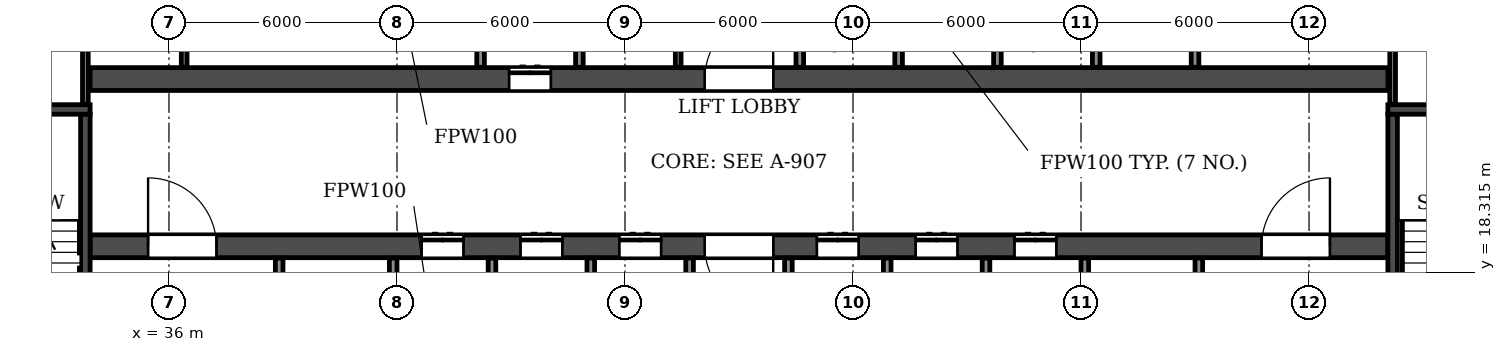
"""IFC4 building model, lengths in metres.
Left out: names, types, materials, properties, quantities, classifications, styles, units other than length and angle.
Written with IfcOpenShell. Run it as: python <this file> out.ifc"""

import sys

from ifc_helpers import new_model, si_unit, direction, frame, frame_2d, origin, place, context, subcontext, project, spatial, rectangle, extrude, element, fill, save


model = new_model("IFC4")
c1 = context("Model", 3, precision=1e-05, world=origin(), true_north=direction((0.0, 1.0)))
c2 = subcontext(c1, "Body", "Model", "MODEL_VIEW")
j1 = project(units=[si_unit("LENGTHUNIT", "METRE"), si_unit("PLANEANGLEUNIT", "RADIAN")], contexts=[c1])
p1 = place(None, origin())
s1 = spatial("IfcSite", under=j1, at=p1, CompositionType="ELEMENT")
p2 = place(p1, origin())
s2 = spatial("IfcBuilding", under=s1, at=p2, CompositionType="ELEMENT")
p3 = place(p2, frame((0.0, 0.0, 26.7)))
s3 = spatial("IfcBuildingStorey", under=s2, at=p3, CompositionType="ELEMENT", Elevation=26.7)
p4 = place(p3, frame((33.925, 19.0, 0.0), z_axis=(0.0, 0.0, 1.0), x_axis=(1.0, 0.0, 0.0)))
e1 = element("IfcWall", 1, at=p4, inside=s3, PredefinedType="SOLIDWALL", context=c2, shape_type="SweptSolid", body=[
    extrude(rectangle(XDim=34.15, YDim=0.6, at=frame_2d((17.075, 0.0))), origin(), (0.0, 0.0, 1.0), 3.05),
])
p5 = place(p4, frame((16.175, 0.0, 0.0)))
e2 = element("IfcOpeningElement", 2, at=p5, cuts=e1, PredefinedType="OPENING", context=c2, shape_type="SweptSolid", body=[
    extrude(rectangle(XDim=1.8, YDim=2.1, at=frame_2d((0.9, 1.05))), frame((0.0, 0.31, 0.0), z_axis=(0.0, -1.0, 0.0), x_axis=(1.0, 0.0, 0.0)), (0.0, 0.0, 1.0), 0.62),
])
p6 = place(p4, frame((1.525, 0.0, 0.0)))
e3 = element("IfcOpeningElement", 3, at=p6, cuts=e1, PredefinedType="OPENING", context=c2, shape_type="SweptSolid", body=[
    extrude(rectangle(XDim=1.8, YDim=2.1, at=frame_2d((0.9, 1.05))), frame((0.0, 0.31, 0.0), z_axis=(0.0, -1.0, 0.0), x_axis=(1.0, 0.0, 0.0)), (0.0, 0.0, 1.0), 0.62),
])
p7 = place(p4, frame((8.725, 0.0, 0.0)))
e4 = element("IfcOpeningElement", 4, at=p7, cuts=e1, PredefinedType="OPENING", context=c2, shape_type="SweptSolid", body=[
    extrude(rectangle(XDim=1.1, YDim=2.1, at=frame_2d((0.55, 1.05))), frame((0.0, 0.31, 0.0), z_axis=(0.0, -1.0, 0.0), x_axis=(1.0, 0.0, 0.0)), (0.0, 0.0, 1.0), 0.62),
])
p8 = place(p4, frame((11.325, 0.0, 0.0)))
e5 = element("IfcOpeningElement", 5, at=p8, cuts=e1, PredefinedType="OPENING", context=c2, shape_type="SweptSolid", body=[
    extrude(rectangle(XDim=1.1, YDim=2.1, at=frame_2d((0.55, 1.05))), frame((0.0, 0.31, 0.0), z_axis=(0.0, -1.0, 0.0), x_axis=(1.0, 0.0, 0.0)), (0.0, 0.0, 1.0), 0.62),
])
p9 = place(p4, frame((13.925, 0.0, 0.0)))
e6 = element("IfcOpeningElement", 6, at=p9, cuts=e1, PredefinedType="OPENING", context=c2, shape_type="SweptSolid", body=[
    extrude(rectangle(XDim=1.1, YDim=2.1, at=frame_2d((0.55, 1.05))), frame((0.0, 0.31, 0.0), z_axis=(0.0, -1.0, 0.0), x_axis=(1.0, 0.0, 0.0)), (0.0, 0.0, 1.0), 0.62),
])
p10 = place(p4, frame((19.125, 0.0, 0.0)))
e7 = element("IfcOpeningElement", 7, at=p10, cuts=e1, PredefinedType="OPENING", context=c2, shape_type="SweptSolid", body=[
    extrude(rectangle(XDim=1.1, YDim=2.1, at=frame_2d((0.55, 1.05))), frame((0.0, 0.31, 0.0), z_axis=(0.0, -1.0, 0.0), x_axis=(1.0, 0.0, 0.0)), (0.0, 0.0, 1.0), 0.62),
])
p11 = place(p4, frame((21.725, 0.0, 0.0)))
e8 = element("IfcOpeningElement", 8, at=p11, cuts=e1, PredefinedType="OPENING", context=c2, shape_type="SweptSolid", body=[
    extrude(rectangle(XDim=1.1, YDim=2.1, at=frame_2d((0.55, 1.05))), frame((0.0, 0.31, 0.0), z_axis=(0.0, -1.0, 0.0), x_axis=(1.0, 0.0, 0.0)), (0.0, 0.0, 1.0), 0.62),
])
p12 = place(p4, frame((24.325, 0.0, 0.0)))
e9 = element("IfcOpeningElement", 9, at=p12, cuts=e1, PredefinedType="OPENING", context=c2, shape_type="SweptSolid", body=[
    extrude(rectangle(XDim=1.1, YDim=2.1, at=frame_2d((0.55, 1.05))), frame((0.0, 0.31, 0.0), z_axis=(0.0, -1.0, 0.0), x_axis=(1.0, 0.0, 0.0)), (0.0, 0.0, 1.0), 0.62),
])
p13 = place(p4, frame((30.825, 0.0, 0.0)))
e10 = element("IfcOpeningElement", 10, at=p13, cuts=e1, PredefinedType="OPENING", context=c2, shape_type="SweptSolid", body=[
    extrude(rectangle(XDim=1.8, YDim=2.1, at=frame_2d((0.9, 1.05))), frame((0.0, 0.31, 0.0), z_axis=(0.0, -1.0, 0.0), x_axis=(1.0, 0.0, 0.0)), (0.0, 0.0, 1.0), 0.62),
])
p14 = place(p3, frame((33.925, 23.4, 0.0), z_axis=(0.0, 0.0, 1.0), x_axis=(1.0, 0.0, 0.0)))
e11 = element("IfcWall", 11, at=p14, inside=s3, PredefinedType="SOLIDWALL", context=c2, shape_type="SweptSolid", body=[
    extrude(rectangle(XDim=34.15, YDim=0.6, at=frame_2d((17.075, 0.0))), origin(), (0.0, 0.0, 1.0), 3.05),
])
p15 = place(p14, frame((16.175, 0.0, 0.0)))
e12 = element("IfcOpeningElement", 12, at=p15, cuts=e11, PredefinedType="OPENING", context=c2, shape_type="SweptSolid", body=[
    extrude(rectangle(XDim=1.8, YDim=2.1, at=frame_2d((0.9, 1.05))), frame((0.0, 0.31, 0.0), z_axis=(0.0, -1.0, 0.0), x_axis=(1.0, 0.0, 0.0)), (0.0, 0.0, 1.0), 0.62),
])
p16 = place(p14, frame((11.025, 0.0, 0.0)))
e13 = element("IfcOpeningElement", 13, at=p16, cuts=e11, PredefinedType="OPENING", context=c2, shape_type="SweptSolid", body=[
    extrude(rectangle(XDim=1.1, YDim=2.1, at=frame_2d((0.55, 1.05))), frame((0.0, 0.31, 0.0), z_axis=(0.0, -1.0, 0.0), x_axis=(1.0, 0.0, 0.0)), (0.0, 0.0, 1.0), 0.62),
])
p17 = place(p3, frame((33.8, 14.9, 0.0), z_axis=(0.0, 0.0, 1.0), x_axis=(0.0, 1.0, 0.0)))
e14 = element("IfcWall", 14, at=p17, inside=s3, PredefinedType="SOLIDWALL", context=c2, shape_type="SweptSolid", body=[
    extrude(rectangle(XDim=7.575, YDim=0.25, at=frame_2d((3.788, 0.0))), origin(), (0.0, 0.0, 1.0), 3.05),
])
p18 = place(p17, frame((0.4, 0.0, 0.0)))
e15 = element("IfcOpeningElement", 15, at=p18, cuts=e14, PredefinedType="OPENING", context=c2, shape_type="SweptSolid", body=[
    extrude(rectangle(XDim=1.0, YDim=2.1, at=frame_2d((0.5, 1.05))), frame((0.0, 0.135, 0.0), z_axis=(0.0, -1.0, 0.0), x_axis=(1.0, 0.0, 0.0)), (0.0, 0.0, 1.0), 0.27),
])
p19 = place(p3, frame((29.875, 22.6, 0.0), z_axis=(0.0, 0.0, 1.0), x_axis=(1.0, 0.0, 0.0)))
e16 = element("IfcWall", 16, at=p19, inside=s3, PredefinedType="SOLIDWALL", context=c2, shape_type="SweptSolid", body=[
    extrude(rectangle(XDim=4.05, YDim=0.25, at=frame_2d((2.025, 0.0))), origin(), (0.0, 0.0, 1.0), 3.05),
])
p20 = place(p3, frame((68.2, 14.9, 0.0), z_axis=(0.0, 0.0, 1.0), x_axis=(0.0, 1.0, 0.0)))
e17 = element("IfcWall", 17, at=p20, inside=s3, PredefinedType="SOLIDWALL", context=c2, shape_type="SweptSolid", body=[
    extrude(rectangle(XDim=7.575, YDim=0.25, at=frame_2d((3.788, 0.0))), origin(), (0.0, 0.0, 1.0), 3.05),
])
p21 = place(p20, frame((0.4, 0.0, 0.0)))
e18 = element("IfcOpeningElement", 18, at=p21, cuts=e17, PredefinedType="OPENING", context=c2, shape_type="SweptSolid", body=[
    extrude(rectangle(XDim=1.0, YDim=2.1, at=frame_2d((0.5, 1.05))), frame((0.0, 0.135, 0.0), z_axis=(0.0, -1.0, 0.0), x_axis=(1.0, 0.0, 0.0)), (0.0, 0.0, 1.0), 0.27),
])
p22 = place(p3, frame((68.075, 22.6, 0.0), z_axis=(0.0, 0.0, 1.0), x_axis=(1.0, 0.0, 0.0)))
e19 = element("IfcWall", 19, at=p22, inside=s3, PredefinedType="SOLIDWALL", context=c2, shape_type="SweptSolid", body=[
    extrude(rectangle(XDim=4.05, YDim=0.25, at=frame_2d((2.025, 0.0))), origin(), (0.0, 0.0, 1.0), 3.05),
])
for number, where, z_axis, x_axis in (
    (20, (49.4, 23.71, 0.0), (0.0, 0.0, 1.0), (0.0, 1.0, 0.0)),
    (21, (36.4, 23.71, 0.0), (0.0, 0.0, 1.0), (0.0, 1.0, 0.0)),
):
    element("IfcWall", number, at=place(p3, frame(where, z_axis=z_axis, x_axis=x_axis)), inside=s3, PredefinedType="PARTITIONING", context=c2, shape_type="SweptSolid", body=[
        extrude(rectangle(XDim=3.78, YDim=0.15, at=frame_2d((1.89, 0.0))), origin(), (0.0, 0.0, 1.0), 3.05),
    ])
p23 = place(p3, frame((63.0, 23.71, 0.0), z_axis=(0.0, 0.0, 1.0), x_axis=(0.0, 1.0, 0.0)))
e22 = element("IfcWall", 22, at=p23, inside=s3, PredefinedType="PARTITIONING", context=c2, shape_type="SweptSolid", body=[
    extrude(rectangle(XDim=3.78, YDim=0.2, at=frame_2d((1.89, 0.0))), origin(), (0.0, 0.0, 1.0), 3.05),
])
for number, where, z_axis, x_axis in (
    (23, (33.8, 22.735, 0.0), (0.0, 0.0, 1.0), (0.0, 1.0, 0.0)),
    (24, (68.2, 22.735, 0.0), (0.0, 0.0, 1.0), (0.0, 1.0, 0.0)),
):
    element("IfcWall", number, at=place(p3, frame(where, z_axis=z_axis, x_axis=x_axis)), inside=s3, PredefinedType="PARTITIONING", context=c2, shape_type="SweptSolid", body=[
        extrude(rectangle(XDim=4.755, YDim=0.15, at=frame_2d((2.377, 0.0))), origin(), (0.0, 0.0, 1.0), 3.05),
    ])
p24 = place(p3, frame((38.9, 14.91, 0.0), z_axis=(0.0, 0.0, 1.0), x_axis=(0.0, 1.0, 0.0)))
e25 = element("IfcWall", 25, at=p24, inside=s3, PredefinedType="PARTITIONING", context=c2, shape_type="SweptSolid", body=[
    extrude(rectangle(XDim=3.78, YDim=0.2, at=frame_2d((1.89, 0.0))), origin(), (0.0, 0.0, 1.0), 3.05),
])
p25 = place(p24, frame((1.34, 0.0, 0.0)))
e26 = element("IfcOpeningElement", 26, at=p25, cuts=e25, PredefinedType="OPENING", context=c2, shape_type="SweptSolid", body=[
    extrude(rectangle(XDim=1.1, YDim=2.1, at=frame_2d((0.55, 1.05))), frame((0.0, 0.11, 0.0), z_axis=(0.0, -1.0, 0.0), x_axis=(1.0, 0.0, 0.0)), (0.0, 0.0, 1.0), 0.22),
])
for number, where, z_axis, x_axis in (
    (27, (41.9, 14.91, 0.0), (0.0, 0.0, 1.0), (0.0, 1.0, 0.0)),
    (28, (44.2, 23.71, 0.0), (0.0, 0.0, 1.0), (0.0, 1.0, 0.0)),
):
    element("IfcWall", number, at=place(p3, frame(where, z_axis=z_axis, x_axis=x_axis)), inside=s3, PredefinedType="PARTITIONING", context=c2, shape_type="SweptSolid", body=[
        extrude(rectangle(XDim=3.78, YDim=0.2, at=frame_2d((1.89, 0.0))), origin(), (0.0, 0.0, 1.0), 3.05),
    ])
p26 = place(p3, frame((44.5, 16.3, 0.0), z_axis=(0.0, 0.0, 1.0), x_axis=(0.0, 1.0, 0.0)))
e29 = element("IfcWall", 29, at=p26, inside=s3, PredefinedType="PARTITIONING", context=c2, shape_type="SweptSolid", body=[
    extrude(rectangle(XDim=2.39, YDim=0.2, at=frame_2d((1.195, 0.0))), origin(), (0.0, 0.0, 1.0), 3.05),
])
p27 = place(p3, frame((46.8, 23.71, 0.0), z_axis=(0.0, 0.0, 1.0), x_axis=(0.0, 1.0, 0.0)))
e30 = element("IfcWall", 30, at=p27, inside=s3, PredefinedType="PARTITIONING", context=c2, shape_type="SweptSolid", body=[
    extrude(rectangle(XDim=3.78, YDim=0.2, at=frame_2d((1.89, 0.0))), origin(), (0.0, 0.0, 1.0), 3.05),
])
for number, where, z_axis, x_axis in (
    (31, (47.1, 16.3, 0.0), (0.0, 0.0, 1.0), (0.0, 1.0, 0.0)),
    (32, (49.7, 16.3, 0.0), (0.0, 0.0, 1.0), (0.0, 1.0, 0.0)),
    (33, (52.3, 16.3, 0.0), (0.0, 0.0, 1.0), (0.0, 1.0, 0.0)),
):
    element("IfcWall", number, at=place(p3, frame(where, z_axis=z_axis, x_axis=x_axis)), inside=s3, PredefinedType="PARTITIONING", context=c2, shape_type="SweptSolid", body=[
        extrude(rectangle(XDim=2.39, YDim=0.2, at=frame_2d((1.195, 0.0))), origin(), (0.0, 0.0, 1.0), 3.05),
    ])
p28 = place(p3, frame((52.6, 23.71, 0.0), z_axis=(0.0, 0.0, 1.0), x_axis=(0.0, 1.0, 0.0)))
e34 = element("IfcWall", 34, at=p28, inside=s3, PredefinedType="PARTITIONING", context=c2, shape_type="SweptSolid", body=[
    extrude(rectangle(XDim=2.39, YDim=0.2, at=frame_2d((1.195, 0.0))), origin(), (0.0, 0.0, 1.0), 3.05),
])
p29 = place(p3, frame((54.9, 16.3, 0.0), z_axis=(0.0, 0.0, 1.0), x_axis=(0.0, 1.0, 0.0)))
e35 = element("IfcWall", 35, at=p29, inside=s3, PredefinedType="PARTITIONING", context=c2, shape_type="SweptSolid", body=[
    extrude(rectangle(XDim=2.39, YDim=0.2, at=frame_2d((1.195, 0.0))), origin(), (0.0, 0.0, 1.0), 3.05),
])
p30 = place(p3, frame((55.2, 23.71, 0.0), z_axis=(0.0, 0.0, 1.0), x_axis=(0.0, 1.0, 0.0)))
e36 = element("IfcWall", 36, at=p30, inside=s3, PredefinedType="PARTITIONING", context=c2, shape_type="SweptSolid", body=[
    extrude(rectangle(XDim=2.39, YDim=0.2, at=frame_2d((1.195, 0.0))), origin(), (0.0, 0.0, 1.0), 3.05),
])
p31 = place(p3, frame((57.5, 16.3, 0.0), z_axis=(0.0, 0.0, 1.0), x_axis=(0.0, 1.0, 0.0)))
e37 = element("IfcWall", 37, at=p31, inside=s3, PredefinedType="PARTITIONING", context=c2, shape_type="SweptSolid", body=[
    extrude(rectangle(XDim=2.39, YDim=0.2, at=frame_2d((1.195, 0.0))), origin(), (0.0, 0.0, 1.0), 3.05),
])
p32 = place(p3, frame((57.8, 23.71, 0.0), z_axis=(0.0, 0.0, 1.0), x_axis=(0.0, 1.0, 0.0)))
e38 = element("IfcWall", 38, at=p32, inside=s3, PredefinedType="PARTITIONING", context=c2, shape_type="SweptSolid", body=[
    extrude(rectangle(XDim=2.39, YDim=0.2, at=frame_2d((1.195, 0.0))), origin(), (0.0, 0.0, 1.0), 3.05),
])
p33 = place(p3, frame((60.1, 14.91, 0.0), z_axis=(0.0, 0.0, 1.0), x_axis=(0.0, 1.0, 0.0)))
e39 = element("IfcWall", 39, at=p33, inside=s3, PredefinedType="PARTITIONING", context=c2, shape_type="SweptSolid", body=[
    extrude(rectangle(XDim=3.78, YDim=0.2, at=frame_2d((1.89, 0.0))), origin(), (0.0, 0.0, 1.0), 3.05),
])
p34 = place(p3, frame((60.4, 23.71, 0.0), z_axis=(0.0, 0.0, 1.0), x_axis=(0.0, 1.0, 0.0)))
e40 = element("IfcWall", 40, at=p34, inside=s3, PredefinedType="PARTITIONING", context=c2, shape_type="SweptSolid", body=[
    extrude(rectangle(XDim=2.39, YDim=0.2, at=frame_2d((1.195, 0.0))), origin(), (0.0, 0.0, 1.0), 3.05),
])
p35 = place(p3, frame((63.1, 14.91, 0.0), z_axis=(0.0, 0.0, 1.0), x_axis=(0.0, 1.0, 0.0)))
e41 = element("IfcWall", 41, at=p35, inside=s3, PredefinedType="PARTITIONING", context=c2, shape_type="SweptSolid", body=[
    extrude(rectangle(XDim=3.78, YDim=0.2, at=frame_2d((1.89, 0.0))), origin(), (0.0, 0.0, 1.0), 3.05),
])
p36 = place(p35, frame((1.34, 0.0, 0.0)))
e42 = element("IfcOpeningElement", 42, at=p36, cuts=e41, PredefinedType="OPENING", context=c2, shape_type="SweptSolid", body=[
    extrude(rectangle(XDim=1.1, YDim=2.1, at=frame_2d((0.55, 1.05))), frame((0.0, 0.11, 0.0), z_axis=(0.0, -1.0, 0.0), x_axis=(1.0, 0.0, 0.0)), (0.0, 0.0, 1.0), 0.22),
])
p37 = place(p15, origin())
e43 = element("IfcDoor", 43, at=p37, inside=s3, OperationType="DOUBLE_DOOR_SINGLE_SWING", PredefinedType="DOOR", context=c2, shape_type="SweptSolid", body=[
    extrude(rectangle(XDim=1.8, YDim=2.1, at=frame_2d((0.9, 1.05))), frame((0.0, 0.025, 0.0), z_axis=(0.0, -1.0, 0.0), x_axis=(1.0, 0.0, 0.0)), (0.0, 0.0, 1.0), 0.05),
])
fill(e12, e43)
p38 = place(p5, frame((1.8, 0.0, 0.0), z_axis=(0.0, 0.0, 1.0), x_axis=(-1.0, 0.0, 0.0)))
e44 = element("IfcDoor", 44, at=p38, inside=s3, OperationType="DOUBLE_DOOR_SINGLE_SWING", PredefinedType="DOOR", context=c2, shape_type="SweptSolid", body=[
    extrude(rectangle(XDim=1.8, YDim=2.1, at=frame_2d((0.9, 1.05))), frame((0.0, 0.025, 0.0), z_axis=(0.0, -1.0, 0.0), x_axis=(1.0, 0.0, 0.0)), (0.0, 0.0, 1.0), 0.05),
])
fill(e2, e44)
p39 = place(p6, origin())
e45 = element("IfcDoor", 45, at=p39, inside=s3, OperationType="DOUBLE_DOOR_SINGLE_SWING", PredefinedType="DOOR", context=c2, shape_type="SweptSolid", body=[
    extrude(rectangle(XDim=1.8, YDim=2.1, at=frame_2d((0.9, 1.05))), frame((0.0, 0.025, 0.0), z_axis=(0.0, -1.0, 0.0), x_axis=(1.0, 0.0, 0.0)), (0.0, 0.0, 1.0), 0.05),
])
fill(e3, e45)
p40 = place(p7, origin())
e46 = element("IfcDoor", 46, at=p40, inside=s3, OperationType="DOUBLE_DOOR_SLIDING", PredefinedType="DOOR", context=c2, shape_type="SweptSolid", body=[
    extrude(rectangle(XDim=1.1, YDim=2.1, at=frame_2d((0.55, 1.05))), frame((0.0, 0.025, 0.0), z_axis=(0.0, -1.0, 0.0), x_axis=(1.0, 0.0, 0.0)), (0.0, 0.0, 1.0), 0.05),
])
fill(e4, e46)
p41 = place(p16, origin())
e47 = element("IfcDoor", 47, at=p41, inside=s3, OperationType="DOUBLE_DOOR_SLIDING", PredefinedType="DOOR", context=c2, shape_type="SweptSolid", body=[
    extrude(rectangle(XDim=1.1, YDim=2.1, at=frame_2d((0.55, 1.05))), frame((0.0, 0.025, 0.0), z_axis=(0.0, -1.0, 0.0), x_axis=(1.0, 0.0, 0.0)), (0.0, 0.0, 1.0), 0.05),
])
fill(e13, e47)
p42 = place(p8, origin())
e48 = element("IfcDoor", 48, at=p42, inside=s3, OperationType="DOUBLE_DOOR_SLIDING", PredefinedType="DOOR", context=c2, shape_type="SweptSolid", body=[
    extrude(rectangle(XDim=1.1, YDim=2.1, at=frame_2d((0.55, 1.05))), frame((0.0, 0.025, 0.0), z_axis=(0.0, -1.0, 0.0), x_axis=(1.0, 0.0, 0.0)), (0.0, 0.0, 1.0), 0.05),
])
fill(e5, e48)
p43 = place(p9, origin())
e49 = element("IfcDoor", 49, at=p43, inside=s3, OperationType="DOUBLE_DOOR_SLIDING", PredefinedType="DOOR", context=c2, shape_type="SweptSolid", body=[
    extrude(rectangle(XDim=1.1, YDim=2.1, at=frame_2d((0.55, 1.05))), frame((0.0, 0.025, 0.0), z_axis=(0.0, -1.0, 0.0), x_axis=(1.0, 0.0, 0.0)), (0.0, 0.0, 1.0), 0.05),
])
fill(e6, e49)
p44 = place(p10, origin())
e50 = element("IfcDoor", 50, at=p44, inside=s3, OperationType="DOUBLE_DOOR_SLIDING", PredefinedType="DOOR", context=c2, shape_type="SweptSolid", body=[
    extrude(rectangle(XDim=1.1, YDim=2.1, at=frame_2d((0.55, 1.05))), frame((0.0, 0.025, 0.0), z_axis=(0.0, -1.0, 0.0), x_axis=(1.0, 0.0, 0.0)), (0.0, 0.0, 1.0), 0.05),
])
fill(e7, e50)
p45 = place(p11, origin())
e51 = element("IfcDoor", 51, at=p45, inside=s3, OperationType="DOUBLE_DOOR_SLIDING", PredefinedType="DOOR", context=c2, shape_type="SweptSolid", body=[
    extrude(rectangle(XDim=1.1, YDim=2.1, at=frame_2d((0.55, 1.05))), frame((0.0, 0.025, 0.0), z_axis=(0.0, -1.0, 0.0), x_axis=(1.0, 0.0, 0.0)), (0.0, 0.0, 1.0), 0.05),
])
fill(e8, e51)
p46 = place(p12, origin())
e52 = element("IfcDoor", 52, at=p46, inside=s3, OperationType="DOUBLE_DOOR_SLIDING", PredefinedType="DOOR", context=c2, shape_type="SweptSolid", body=[
    extrude(rectangle(XDim=1.1, YDim=2.1, at=frame_2d((0.55, 1.05))), frame((0.0, 0.025, 0.0), z_axis=(0.0, -1.0, 0.0), x_axis=(1.0, 0.0, 0.0)), (0.0, 0.0, 1.0), 0.05),
])
fill(e9, e52)
p47 = place(p13, origin())
e53 = element("IfcDoor", 53, at=p47, inside=s3, OperationType="DOUBLE_DOOR_SINGLE_SWING", PredefinedType="DOOR", context=c2, shape_type="SweptSolid", body=[
    extrude(rectangle(XDim=1.8, YDim=2.1, at=frame_2d((0.9, 1.05))), frame((0.0, 0.025, 0.0), z_axis=(0.0, -1.0, 0.0), x_axis=(1.0, 0.0, 0.0)), (0.0, 0.0, 1.0), 0.05),
])
fill(e10, e53)
save(model, sys.argv[1])
